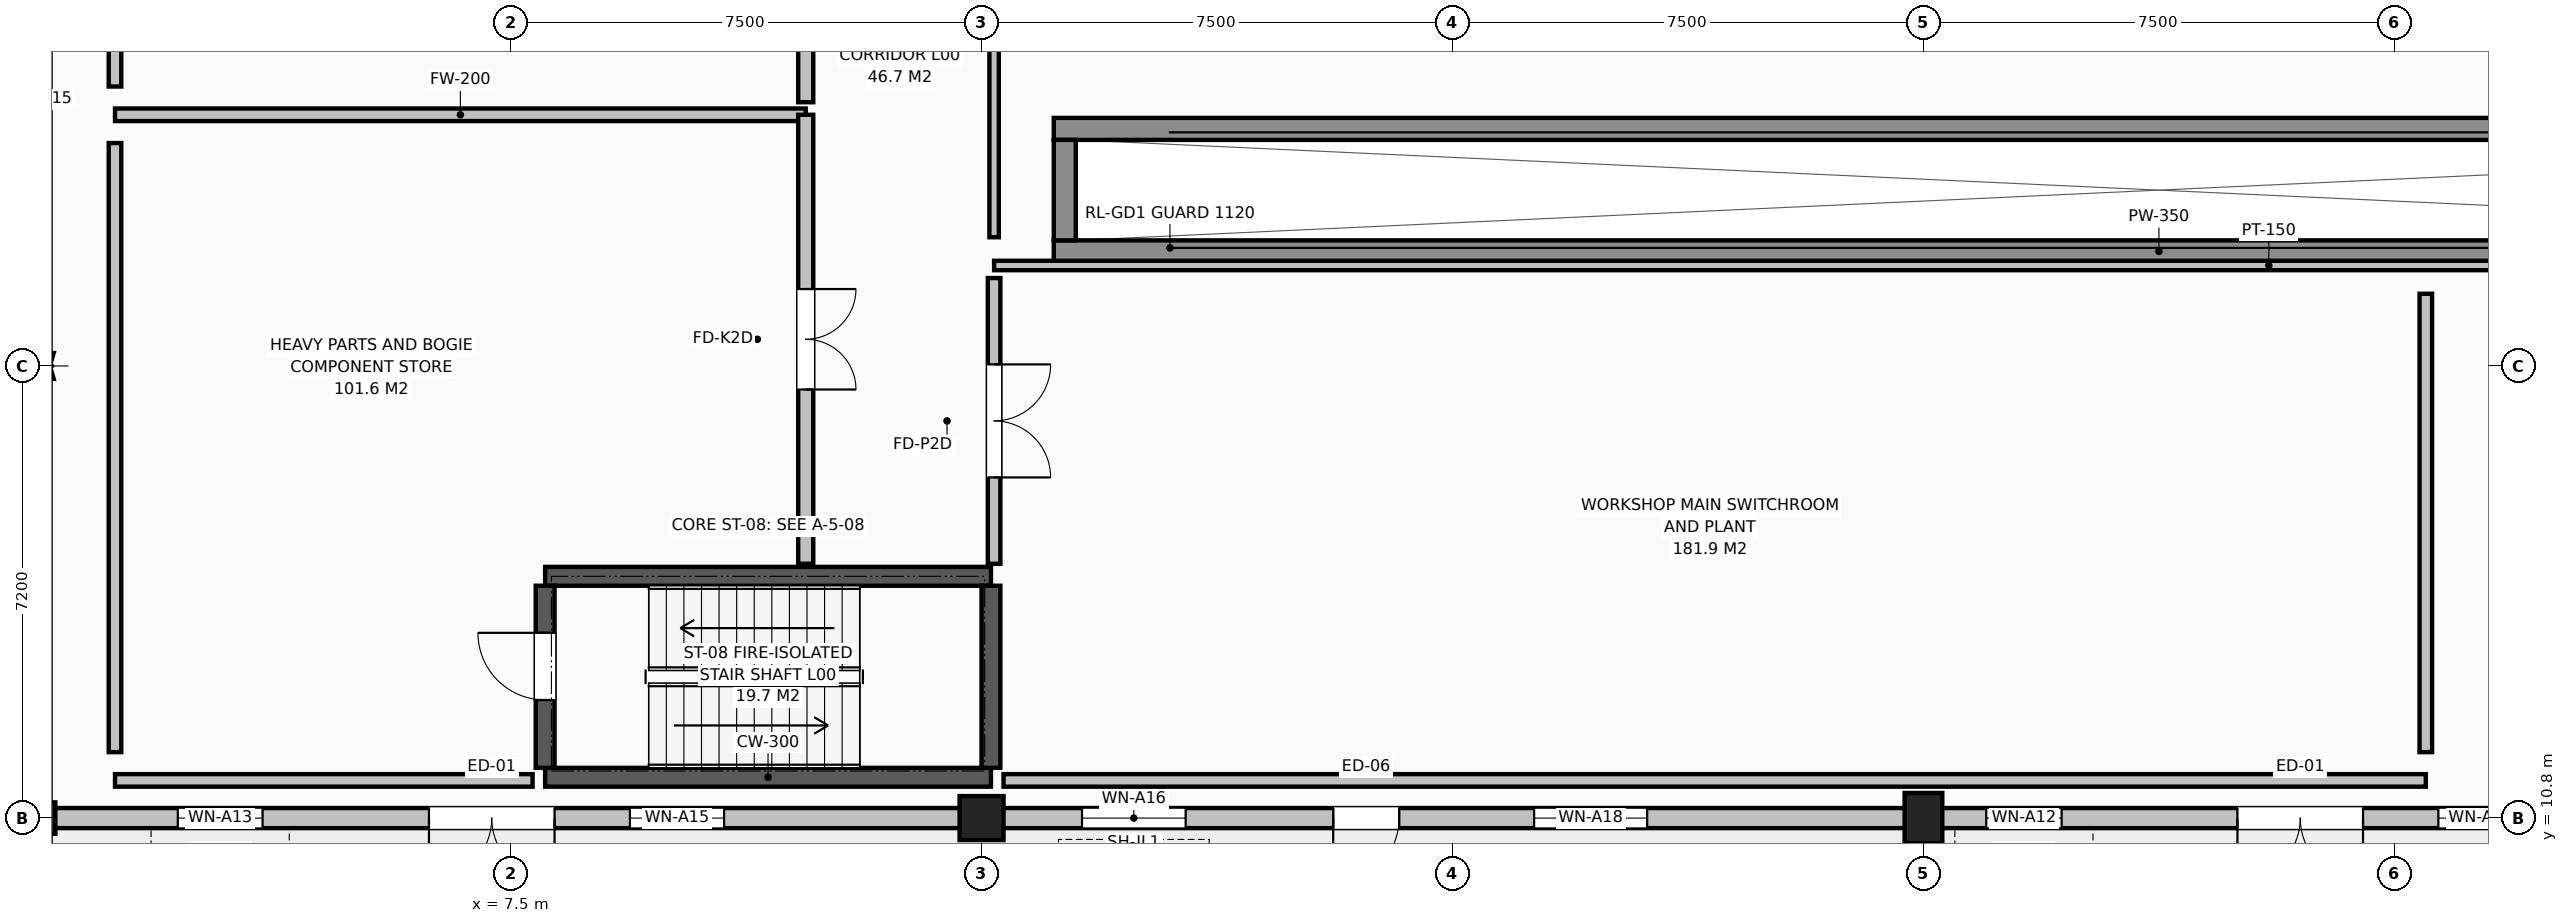
"""IFC4 building model, lengths in metres.
Left out: names, types, materials, properties, quantities, classifications, styles, units other than length and angle.
Written with IfcOpenShell. Run it as: python <this file> out.ifc"""

import sys

from ifc_helpers import new_model, si_unit, direction, frame, frame_2d, origin, origin_2d, place, context, subcontext, project, spatial, rectangle, extrude, element, fill, save


model = new_model("IFC4")
c1 = context("Model", 3, precision=1e-05, world=origin(), true_north=direction((0.0, 1.0)))
c2 = subcontext(c1, "Body", "Model", "MODEL_VIEW")
j1 = project(units=[si_unit("LENGTHUNIT", "METRE"), si_unit("PLANEANGLEUNIT", "RADIAN")], contexts=[c1])
p1 = place(None, origin())
s1 = spatial("IfcSite", under=j1, at=p1, CompositionType="ELEMENT")
p2 = place(p1, origin())
s2 = spatial("IfcBuilding", under=s1, at=p2, CompositionType="ELEMENT")
p3 = place(p2, origin())
s3 = spatial("IfcBuildingStorey", under=s2, at=p3, CompositionType="ELEMENT", Elevation=0.0)
for number, where, z_axis, x_axis in (
    (1, (16.15, 19.825, -1.65), (0.0, 0.0, 1.0), (1.0, 0.0, 0.0)),
    (2, (16.15, 21.775, -1.65), (0.0, 0.0, 1.0), (1.0, 0.0, 0.0)),
):
    element("IfcWall", number, at=place(p3, frame(where, z_axis=z_axis, x_axis=x_axis)), inside=s3, PredefinedType="USERDEFINED", context=c2, shape_type="SweptSolid", body=[
        extrude(rectangle(XDim=35.2, YDim=0.35, at=frame_2d((17.6, 0.0))), origin(), (0.0, 0.0, 1.0), 1.225),
    ])
p4 = place(p3, frame((16.325, 20.0, -1.65), z_axis=(0.0, 0.0, 1.0), x_axis=(0.0, 1.0, 0.0)))
e3 = element("IfcWall", 3, at=p4, inside=s3, PredefinedType="USERDEFINED", context=c2, shape_type="SweptSolid", body=[
    extrude(rectangle(XDim=1.6, YDim=0.35, at=frame_2d((0.8, 0.0))), origin(), (0.0, 0.0, 1.0), 1.225),
])
p5 = place(p3, frame((0.0, 10.8, 0.0), z_axis=(0.0, 0.0, 1.0), x_axis=(1.0, 0.0, 0.0)))
e4 = element("IfcColumn", 4, at=p5, inside=s3, PredefinedType="COLUMN", context=c2, shape_type="SweptSolid", body=[
    extrude(rectangle(XDim=0.5, YDim=0.5, at=origin_2d()), origin(), (0.0, 0.0, 1.0), 4.8),
])
p6 = place(p3, frame((15.0, 10.8, 0.0), z_axis=(0.0, 0.0, 1.0), x_axis=(1.0, 0.0, 0.0)))
e5 = element("IfcColumn", 5, at=p6, inside=s3, PredefinedType="COLUMN", context=c2, shape_type="SweptSolid", body=[
    extrude(rectangle(XDim=0.7, YDim=0.7, at=origin_2d()), origin(), (0.0, 0.0, 1.0), 4.8),
])
p7 = place(p3, frame((30.0, 10.8, 0.0), z_axis=(0.0, 0.0, 1.0), x_axis=(1.0, 0.0, 0.0)))
e6 = element("IfcColumn", 6, at=p7, inside=s3, PredefinedType="COLUMN", context=c2, shape_type="SweptSolid", body=[
    extrude(rectangle(XDim=0.6, YDim=0.8, at=origin_2d()), origin(), (0.0, 0.0, 1.0), 4.8),
])
p8 = place(p3, frame((0.0, 10.8, 0.0), z_axis=(0.0, 0.0, 1.0), x_axis=(1.0, 0.0, 0.0)))
e7 = element("IfcWall", 7, at=p8, inside=s3, PredefinedType="SOLIDWALL", context=c2, shape_type="SweptSolid", body=[
    extrude(rectangle(XDim=93.6, YDim=0.32, at=frame_2d((46.8, 0.0))), origin(), (0.0, 0.0, 1.0), 4.25),
])
p9 = place(p8, frame((2.2, 0.0, 0.72)))
e8 = element("IfcOpeningElement", 8, at=p9, cuts=e7, PredefinedType="OPENING", context=c2, shape_type="SweptSolid", body=[
    extrude(rectangle(XDim=1.35, YDim=2.05, at=frame_2d((0.675, 1.025))), frame((0.0, 0.17, 0.0), z_axis=(0.0, -1.0, 0.0), x_axis=(1.0, 0.0, 0.0)), (0.0, 0.0, 1.0), 0.34),
])
p10 = place(p8, frame((9.4, 0.0, 0.72)))
e9 = element("IfcOpeningElement", 9, at=p10, cuts=e7, PredefinedType="OPENING", context=c2, shape_type="SweptSolid", body=[
    extrude(rectangle(XDim=1.5, YDim=2.1, at=frame_2d((0.75, 1.05))), frame((0.0, 0.17, 0.0), z_axis=(0.0, -1.0, 0.0), x_axis=(1.0, 0.0, 0.0)), (0.0, 0.0, 1.0), 0.34),
])
p11 = place(p8, frame((16.6, 0.0, 0.72)))
e10 = element("IfcOpeningElement", 10, at=p11, cuts=e7, PredefinedType="OPENING", context=c2, shape_type="SweptSolid", body=[
    extrude(rectangle(XDim=1.65, YDim=2.1, at=frame_2d((0.825, 1.05))), frame((0.0, 0.17, 0.0), z_axis=(0.0, -1.0, 0.0), x_axis=(1.0, 0.0, 0.0)), (0.0, 0.0, 1.0), 0.34),
])
p12 = place(p8, frame((23.8, 0.0, 0.72)))
e11 = element("IfcOpeningElement", 11, at=p12, cuts=e7, PredefinedType="OPENING", context=c2, shape_type="SweptSolid", body=[
    extrude(rectangle(XDim=1.8, YDim=2.15, at=frame_2d((0.9, 1.075))), frame((0.0, 0.17, 0.0), z_axis=(0.0, -1.0, 0.0), x_axis=(1.0, 0.0, 0.0)), (0.0, 0.0, 1.0), 0.34),
])
p13 = place(p8, frame((31.0, 0.0, 0.72)))
e12 = element("IfcOpeningElement", 12, at=p13, cuts=e7, PredefinedType="OPENING", context=c2, shape_type="SweptSolid", body=[
    extrude(rectangle(XDim=1.2, YDim=2.0, at=frame_2d((0.6, 1.0))), frame((0.0, 0.17, 0.0), z_axis=(0.0, -1.0, 0.0), x_axis=(1.0, 0.0, 0.0)), (0.0, 0.0, 1.0), 0.34),
])
p14 = place(p8, frame((38.2, 0.0, 0.72)))
e13 = element("IfcOpeningElement", 13, at=p14, cuts=e7, PredefinedType="OPENING", context=c2, shape_type="SweptSolid", body=[
    extrude(rectangle(XDim=1.35, YDim=2.05, at=frame_2d((0.675, 1.025))), frame((0.0, 0.17, 0.0), z_axis=(0.0, -1.0, 0.0), x_axis=(1.0, 0.0, 0.0)), (0.0, 0.0, 1.0), 0.34),
])
p15 = place(p8, frame((52.6, 0.0, 0.72)))
e14 = element("IfcOpeningElement", 14, at=p15, cuts=e7, PredefinedType="OPENING", context=c2, shape_type="SweptSolid", body=[
    extrude(rectangle(XDim=1.65, YDim=2.1, at=frame_2d((0.825, 1.05))), frame((0.0, 0.17, 0.0), z_axis=(0.0, -1.0, 0.0), x_axis=(1.0, 0.0, 0.0)), (0.0, 0.0, 1.0), 0.34),
])
p16 = place(p8, frame((67.0, 0.0, 0.72)))
e15 = element("IfcOpeningElement", 15, at=p16, cuts=e7, PredefinedType="OPENING", context=c2, shape_type="SweptSolid", body=[
    extrude(rectangle(XDim=1.2, YDim=2.0, at=frame_2d((0.6, 1.0))), frame((0.0, 0.17, 0.0), z_axis=(0.0, -1.0, 0.0), x_axis=(1.0, 0.0, 0.0)), (0.0, 0.0, 1.0), 0.34),
])
p17 = place(p8, frame((81.4, 0.0, 0.72)))
e16 = element("IfcOpeningElement", 16, at=p17, cuts=e7, PredefinedType="OPENING", context=c2, shape_type="SweptSolid", body=[
    extrude(rectangle(XDim=1.5, YDim=2.1, at=frame_2d((0.75, 1.05))), frame((0.0, 0.17, 0.0), z_axis=(0.0, -1.0, 0.0), x_axis=(1.0, 0.0, 0.0)), (0.0, 0.0, 1.0), 0.34),
])
p18 = place(p8, frame((6.2, 0.0, 0.0)))
e17 = element("IfcOpeningElement", 17, at=p18, cuts=e7, PredefinedType="OPENING", context=c2, shape_type="SweptSolid", body=[
    extrude(rectangle(XDim=2.0, YDim=2.35, at=frame_2d((1.0, 1.175))), frame((0.0, 0.17, 0.0), z_axis=(0.0, -1.0, 0.0), x_axis=(1.0, 0.0, 0.0)), (0.0, 0.0, 1.0), 0.34),
])
p19 = place(p8, frame((20.6, 0.0, 0.0)))
e18 = element("IfcOpeningElement", 18, at=p19, cuts=e7, PredefinedType="OPENING", context=c2, shape_type="SweptSolid", body=[
    extrude(rectangle(XDim=1.05, YDim=2.1, at=frame_2d((0.525, 1.05))), frame((0.0, 0.17, 0.0), z_axis=(0.0, -1.0, 0.0), x_axis=(1.0, 0.0, 0.0)), (0.0, 0.0, 1.0), 0.34),
])
p20 = place(p8, frame((35.0, 0.0, 0.0)))
e19 = element("IfcOpeningElement", 19, at=p20, cuts=e7, PredefinedType="OPENING", context=c2, shape_type="SweptSolid", body=[
    extrude(rectangle(XDim=2.0, YDim=2.35, at=frame_2d((1.0, 1.175))), frame((0.0, 0.17, 0.0), z_axis=(0.0, -1.0, 0.0), x_axis=(1.0, 0.0, 0.0)), (0.0, 0.0, 1.0), 0.34),
])
p21 = place(p8, frame((49.4, 0.0, 0.0)))
e20 = element("IfcOpeningElement", 20, at=p21, cuts=e7, PredefinedType="OPENING", context=c2, shape_type="SweptSolid", body=[
    extrude(rectangle(XDim=2.0, YDim=2.35, at=frame_2d((1.0, 1.175))), frame((0.0, 0.17, 0.0), z_axis=(0.0, -1.0, 0.0), x_axis=(1.0, 0.0, 0.0)), (0.0, 0.0, 1.0), 0.34),
])
p22 = place(p8, frame((63.8, 0.0, 0.0)))
e21 = element("IfcOpeningElement", 21, at=p22, cuts=e7, PredefinedType="OPENING", context=c2, shape_type="SweptSolid", body=[
    extrude(rectangle(XDim=1.1, YDim=2.1, at=frame_2d((0.55, 1.05))), frame((0.0, 0.17, 0.0), z_axis=(0.0, -1.0, 0.0), x_axis=(1.0, 0.0, 0.0)), (0.0, 0.0, 1.0), 0.34),
])
for number, where, z_axis, x_axis in (
    (22, (8.05, 11.45, 0.0), (0.0, 0.0, 1.0), (1.0, 0.0, 0.0)),
    (23, (15.15, 14.65, 0.0), (0.0, 0.0, 1.0), (-1.0, 0.0, 0.0)),
):
    element("IfcWall", number, at=place(p3, frame(where, z_axis=z_axis, x_axis=x_axis)), inside=s3, PredefinedType="SHEAR", context=c2, shape_type="SweptSolid", body=[
        extrude(rectangle(XDim=7.1, YDim=0.3, at=frame_2d((3.55, 0.0))), origin(), (0.0, 0.0, 1.0), 4.5),
    ])
p23 = place(p3, frame((15.15, 11.6, 0.0), z_axis=(0.0, 0.0, 1.0), x_axis=(0.0, 1.0, 0.0)))
e24 = element("IfcWall", 24, at=p23, inside=s3, PredefinedType="SHEAR", context=c2, shape_type="SweptSolid", body=[
    extrude(rectangle(XDim=2.9, YDim=0.3, at=frame_2d((1.45, 0.0))), origin(), (0.0, 0.0, 1.0), 4.5),
])
p24 = place(p3, frame((8.05, 14.5, 0.0), z_axis=(0.0, 0.0, 1.0), x_axis=(0.0, -1.0, 0.0)))
e25 = element("IfcWall", 25, at=p24, inside=s3, PredefinedType="SHEAR", context=c2, shape_type="SweptSolid", body=[
    extrude(rectangle(XDim=2.9, YDim=0.3, at=frame_2d((1.45, 0.0))), origin(), (0.0, 0.0, 1.0), 4.5),
])
p25 = place(p24, frame((0.75, 0.0, 0.0)))
e26 = element("IfcOpeningElement", 26, at=p25, cuts=e25, PredefinedType="OPENING", context=c2, shape_type="SweptSolid", body=[
    extrude(rectangle(XDim=1.07, YDim=2.15, at=frame_2d((0.535, 1.075))), frame((0.0, 0.16, 0.0), z_axis=(0.0, -1.0, 0.0), x_axis=(1.0, 0.0, 0.0)), (0.0, 0.0, 1.0), 0.32),
])
p26 = place(p3, frame((55.8, 19.6, 0.0), z_axis=(0.0, 0.0, 1.0), x_axis=(-1.0, 0.0, 0.0)))
e27 = element("IfcWall", 27, at=p26, inside=s3, PredefinedType="PARTITIONING", context=c2, shape_type="SweptSolid", body=[
    extrude(rectangle(XDim=40.6, YDim=0.15, at=frame_2d((20.3, 0.0))), origin(), (0.0, 0.0, 1.0), 3.682),
])
p27 = place(p3, frame((15.2, 32.6, 0.0), z_axis=(0.0, 0.0, 1.0), x_axis=(0.0, -1.0, 0.0)))
e28 = element("IfcWall", 28, at=p27, inside=s3, PredefinedType="PARTITIONING", context=c2, shape_type="SweptSolid", body=[
    extrude(rectangle(XDim=12.55, YDim=0.15, at=frame_2d((6.275, 0.0))), origin(), (0.0, 0.0, 1.0), 4.1),
])
p28 = place(p3, frame((1.2, 22.0, 0.0), z_axis=(0.0, 0.0, 1.0), x_axis=(1.0, 0.0, 0.0)))
e29 = element("IfcWall", 29, at=p28, inside=s3, PredefinedType="SOLIDWALL", context=c2, shape_type="SweptSolid", body=[
    extrude(rectangle(XDim=11.0, YDim=0.2, at=frame_2d((5.5, 0.0))), origin(), (0.0, 0.0, 1.0), 4.1),
])
p29 = place(p3, frame((7.85, 11.4, 0.0), z_axis=(0.0, 0.0, 1.0), x_axis=(-1.0, 0.0, 0.0)))
e30 = element("IfcWall", 30, at=p29, inside=s3, PredefinedType="SOLIDWALL", context=c2, shape_type="SweptSolid", body=[
    extrude(rectangle(XDim=6.65, YDim=0.2, at=frame_2d((3.325, 0.0))), origin(), (0.0, 0.0, 1.0), 4.1),
])
p30 = place(p3, frame((1.2, 21.55, 0.0), z_axis=(0.0, 0.0, 1.0), x_axis=(0.0, -1.0, 0.0)))
e31 = element("IfcWall", 31, at=p30, inside=s3, PredefinedType="SOLIDWALL", context=c2, shape_type="SweptSolid", body=[
    extrude(rectangle(XDim=9.7, YDim=0.2, at=frame_2d((4.85, 0.0))), origin(), (0.0, 0.0, 1.0), 4.1),
])
p31 = place(p3, frame((12.2, 14.85, 0.0), z_axis=(0.0, 0.0, 1.0), x_axis=(0.0, 1.0, 0.0)))
e32 = element("IfcWall", 32, at=p31, inside=s3, PredefinedType="SOLIDWALL", context=c2, shape_type="SweptSolid", body=[
    extrude(rectangle(XDim=7.15, YDim=0.24, at=frame_2d((3.575, 0.0))), origin(), (0.0, 0.0, 1.0), 4.1),
])
p32 = place(p31, frame((2.775, 0.0, 0.0)))
e33 = element("IfcOpeningElement", 33, at=p32, cuts=e32, PredefinedType="OPENING", context=c2, shape_type="SweptSolid", body=[
    extrude(rectangle(XDim=1.6, YDim=2.15, at=frame_2d((0.8, 1.075))), frame((0.0, 0.13, 0.0), z_axis=(0.0, -1.0, 0.0), x_axis=(1.0, 0.0, 0.0)), (0.0, 0.0, 1.0), 0.26),
])
p33 = place(p3, frame((1.2, 32.15, 0.0), z_axis=(0.0, 0.0, 1.0), x_axis=(0.0, -1.0, 0.0)))
e34 = element("IfcWall", 34, at=p33, inside=s3, PredefinedType="SOLIDWALL", context=c2, shape_type="SweptSolid", body=[
    extrude(rectangle(XDim=9.7, YDim=0.2, at=frame_2d((4.85, 0.0))), origin(), (0.0, 0.0, 1.0), 4.1),
])
p34 = place(p3, frame((12.2, 22.2, 0.0), z_axis=(0.0, 0.0, 1.0), x_axis=(0.0, 1.0, 0.0)))
e35 = element("IfcWall", 35, at=p34, inside=s3, PredefinedType="SOLIDWALL", context=c2, shape_type="SweptSolid", body=[
    extrude(rectangle(XDim=10.4, YDim=0.24, at=frame_2d((5.2, 0.0))), origin(), (0.0, 0.0, 1.0), 3.87),
])
p35 = place(p34, frame((4.4, 0.0, 0.0)))
e36 = element("IfcOpeningElement", 36, at=p35, cuts=e35, PredefinedType="OPENING", context=c2, shape_type="SweptSolid", body=[
    extrude(rectangle(XDim=1.6, YDim=2.15, at=frame_2d((0.8, 1.075))), frame((0.0, 0.13, 0.0), z_axis=(0.0, -1.0, 0.0), x_axis=(1.0, 0.0, 0.0)), (0.0, 0.0, 1.0), 0.26),
])
p36 = place(p3, frame((38.0, 11.4, 0.0), z_axis=(0.0, 0.0, 1.0), x_axis=(-1.0, 0.0, 0.0)))
e37 = element("IfcWall", 37, at=p36, inside=s3, PredefinedType="SOLIDWALL", context=c2, shape_type="SweptSolid", body=[
    extrude(rectangle(XDim=22.65, YDim=0.2, at=frame_2d((11.325, 0.0))), origin(), (0.0, 0.0, 1.0), 3.682),
])
p37 = place(p3, frame((38.0, 11.85, 0.0), z_axis=(0.0, 0.0, 1.0), x_axis=(0.0, 1.0, 0.0)))
e38 = element("IfcWall", 38, at=p37, inside=s3, PredefinedType="SOLIDWALL", context=c2, shape_type="SweptSolid", body=[
    extrude(rectangle(XDim=7.3, YDim=0.2, at=frame_2d((3.65, 0.0))), origin(), (0.0, 0.0, 1.0), 4.1),
])
p38 = place(p3, frame((15.2, 19.4, 0.0), z_axis=(0.0, 0.0, 1.0), x_axis=(0.0, -1.0, 0.0)))
e39 = element("IfcWall", 39, at=p38, inside=s3, PredefinedType="SOLIDWALL", context=c2, shape_type="SweptSolid", body=[
    extrude(rectangle(XDim=4.55, YDim=0.2, at=frame_2d((2.275, 0.0))), origin(), (0.0, 0.0, 1.0), 4.1),
])
p39 = place(p38, frame((1.375, 0.0, 0.0)))
e40 = element("IfcOpeningElement", 40, at=p39, cuts=e39, PredefinedType="OPENING", context=c2, shape_type="SweptSolid", body=[
    extrude(rectangle(XDim=1.8, YDim=2.2, at=frame_2d((0.9, 1.1))), frame((0.0, 0.11, 0.0), z_axis=(0.0, -1.0, 0.0), x_axis=(1.0, 0.0, 0.0)), (0.0, 0.0, 1.0), 0.22),
])
p40 = place(p9, origin())
e41 = element("IfcWindow", 41, at=p40, inside=s3, PartitioningType="SINGLE_PANEL", PredefinedType="WINDOW", context=c2, shape_type="SweptSolid", body=[
    extrude(rectangle(XDim=1.35, YDim=2.05, at=frame_2d((0.675, 1.025))), frame((0.0, 0.03, 0.0), z_axis=(0.0, -1.0, 0.0), x_axis=(1.0, 0.0, 0.0)), (0.0, 0.0, 1.0), 0.06),
])
fill(e8, e41)
p41 = place(p10, origin())
e42 = element("IfcWindow", 42, at=p41, inside=s3, PartitioningType="SINGLE_PANEL", PredefinedType="WINDOW", context=c2, shape_type="SweptSolid", body=[
    extrude(rectangle(XDim=1.5, YDim=2.1, at=frame_2d((0.75, 1.05))), frame((0.0, 0.03, 0.0), z_axis=(0.0, -1.0, 0.0), x_axis=(1.0, 0.0, 0.0)), (0.0, 0.0, 1.0), 0.06),
])
fill(e9, e42)
p42 = place(p11, origin())
e43 = element("IfcWindow", 43, at=p42, inside=s3, PartitioningType="SINGLE_PANEL", PredefinedType="WINDOW", context=c2, shape_type="SweptSolid", body=[
    extrude(rectangle(XDim=1.65, YDim=2.1, at=frame_2d((0.825, 1.05))), frame((0.0, 0.03, 0.0), z_axis=(0.0, -1.0, 0.0), x_axis=(1.0, 0.0, 0.0)), (0.0, 0.0, 1.0), 0.06),
])
fill(e10, e43)
p43 = place(p12, origin())
e44 = element("IfcWindow", 44, at=p43, inside=s3, PartitioningType="SINGLE_PANEL", PredefinedType="WINDOW", context=c2, shape_type="SweptSolid", body=[
    extrude(rectangle(XDim=1.8, YDim=2.15, at=frame_2d((0.9, 1.075))), frame((0.0, 0.03, 0.0), z_axis=(0.0, -1.0, 0.0), x_axis=(1.0, 0.0, 0.0)), (0.0, 0.0, 1.0), 0.06),
])
fill(e11, e44)
p44 = place(p13, origin())
e45 = element("IfcWindow", 45, at=p44, inside=s3, PartitioningType="SINGLE_PANEL", PredefinedType="WINDOW", context=c2, shape_type="SweptSolid", body=[
    extrude(rectangle(XDim=1.2, YDim=2.0, at=frame_2d((0.6, 1.0))), frame((0.0, 0.03, 0.0), z_axis=(0.0, -1.0, 0.0), x_axis=(1.0, 0.0, 0.0)), (0.0, 0.0, 1.0), 0.06),
])
fill(e12, e45)
p45 = place(p14, origin())
e46 = element("IfcWindow", 46, at=p45, inside=s3, PartitioningType="SINGLE_PANEL", PredefinedType="WINDOW", context=c2, shape_type="SweptSolid", body=[
    extrude(rectangle(XDim=1.35, YDim=2.05, at=frame_2d((0.675, 1.025))), frame((0.0, 0.03, 0.0), z_axis=(0.0, -1.0, 0.0), x_axis=(1.0, 0.0, 0.0)), (0.0, 0.0, 1.0), 0.06),
])
fill(e13, e46)
p46 = place(p18, frame((2.0, 0.0, 0.0), z_axis=(0.0, 0.0, 1.0), x_axis=(-1.0, 0.0, 0.0)))
e47 = element("IfcDoor", 47, at=p46, inside=s3, OperationType="DOUBLE_SWING_LEFT", PredefinedType="DOOR", context=c2, shape_type="SweptSolid", body=[
    extrude(rectangle(XDim=2.0, YDim=2.35, at=frame_2d((1.0, 1.175))), frame((0.0, 0.025, 0.0), z_axis=(0.0, -1.0, 0.0), x_axis=(1.0, 0.0, 0.0)), (0.0, 0.0, 1.0), 0.05),
])
fill(e17, e47)
p47 = place(p19, frame((1.05, 0.0, 0.0), z_axis=(0.0, 0.0, 1.0), x_axis=(-1.0, 0.0, 0.0)))
e48 = element("IfcDoor", 48, at=p47, inside=s3, OperationType="SINGLE_SWING_RIGHT", PredefinedType="DOOR", context=c2, shape_type="SweptSolid", body=[
    extrude(rectangle(XDim=1.05, YDim=2.1, at=frame_2d((0.525, 1.05))), frame((0.0, 0.025, 0.0), z_axis=(0.0, -1.0, 0.0), x_axis=(1.0, 0.0, 0.0)), (0.0, 0.0, 1.0), 0.05),
])
fill(e18, e48)
p48 = place(p20, frame((2.0, 0.0, 0.0), z_axis=(0.0, 0.0, 1.0), x_axis=(-1.0, 0.0, 0.0)))
e49 = element("IfcDoor", 49, at=p48, inside=s3, OperationType="DOUBLE_SWING_LEFT", PredefinedType="DOOR", context=c2, shape_type="SweptSolid", body=[
    extrude(rectangle(XDim=2.0, YDim=2.35, at=frame_2d((1.0, 1.175))), frame((0.0, 0.025, 0.0), z_axis=(0.0, -1.0, 0.0), x_axis=(1.0, 0.0, 0.0)), (0.0, 0.0, 1.0), 0.05),
])
fill(e19, e49)
p49 = place(p25, frame((1.07, 0.0, 0.0), z_axis=(0.0, 0.0, 1.0), x_axis=(-1.0, 0.0, 0.0)))
e50 = element("IfcDoor", 50, at=p49, inside=s3, OperationType="SINGLE_SWING_RIGHT", PredefinedType="DOOR", context=c2, shape_type="SweptSolid", body=[
    extrude(rectangle(XDim=1.07, YDim=2.15, at=frame_2d((0.535, 1.075))), frame((0.0, 0.025, 0.0), z_axis=(0.0, -1.0, 0.0), x_axis=(1.0, 0.0, 0.0)), (0.0, 0.0, 1.0), 0.05),
])
fill(e26, e50)
p50 = place(p32, origin())
e51 = element("IfcDoor", 51, at=p50, inside=s3, OperationType="DOUBLE_SWING_RIGHT", PredefinedType="DOOR", context=c2, shape_type="SweptSolid", body=[
    extrude(rectangle(XDim=1.6, YDim=2.15, at=frame_2d((0.8, 1.075))), frame((0.0, 0.025, 0.0), z_axis=(0.0, -1.0, 0.0), x_axis=(1.0, 0.0, 0.0)), (0.0, 0.0, 1.0), 0.05),
])
fill(e33, e51)
p51 = place(p39, origin())
e52 = element("IfcDoor", 52, at=p51, inside=s3, OperationType="DOUBLE_SWING_LEFT", PredefinedType="DOOR", context=c2, shape_type="SweptSolid", body=[
    extrude(rectangle(XDim=1.8, YDim=2.2, at=frame_2d((0.9, 1.1))), frame((0.0, 0.025, 0.0), z_axis=(0.0, -1.0, 0.0), x_axis=(1.0, 0.0, 0.0)), (0.0, 0.0, 1.0), 0.05),
])
fill(e40, e52)
save(model, sys.argv[1])
